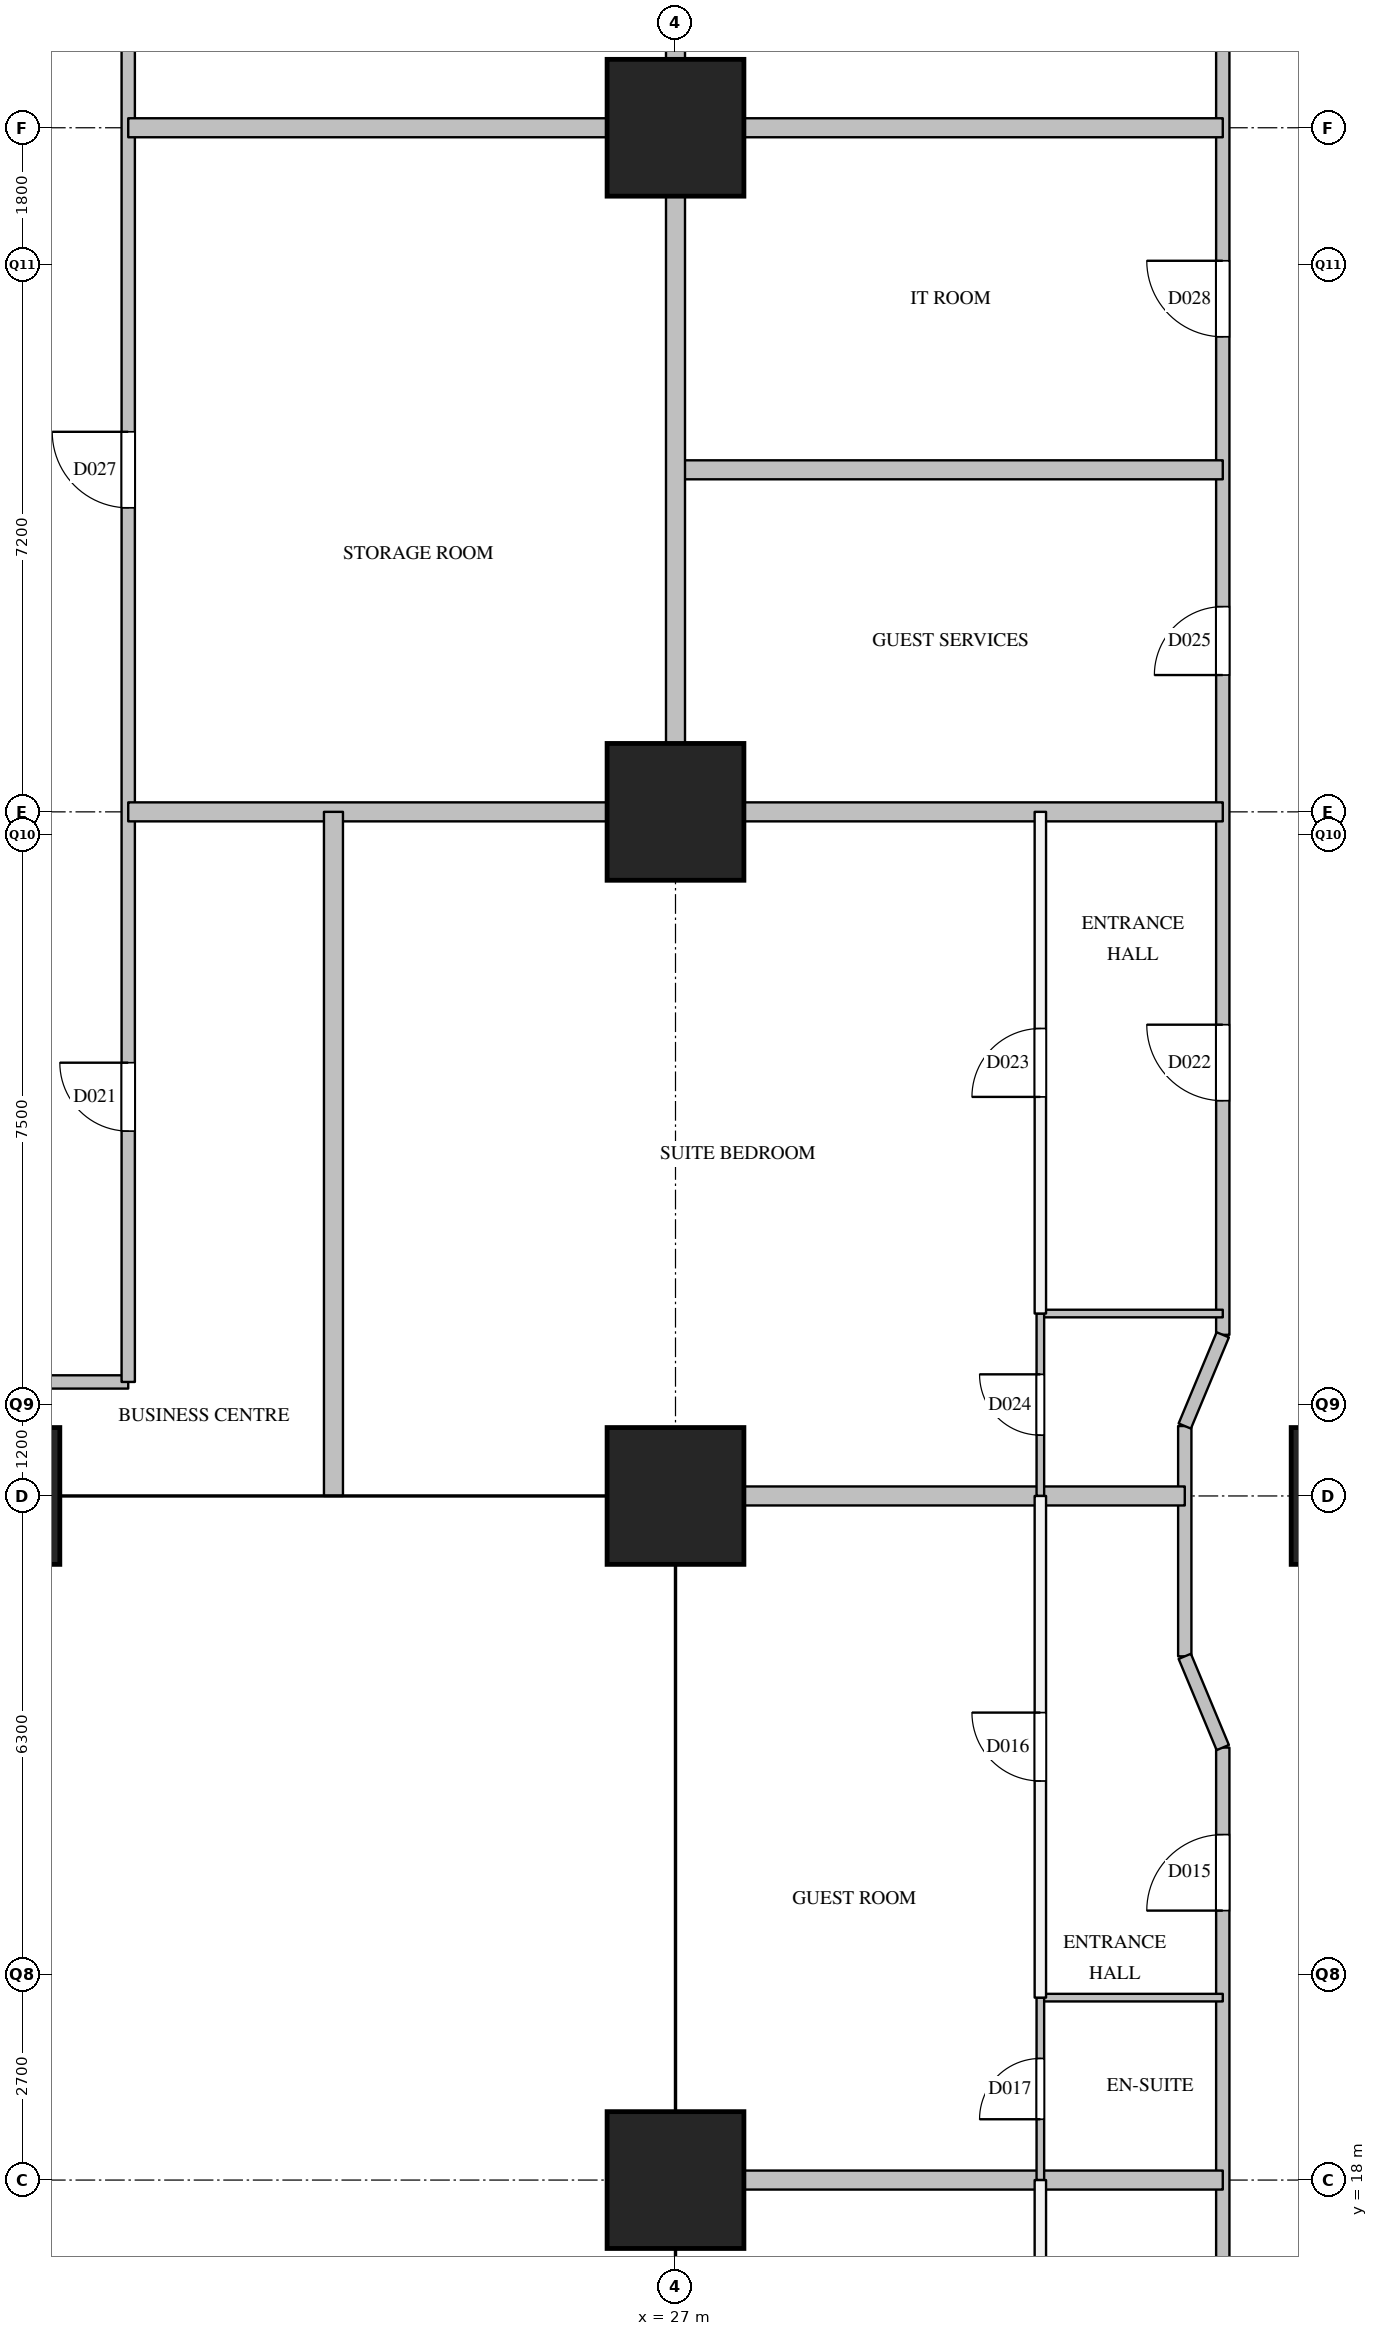
"""IFC4 building model, lengths in metres.
Left out: names, types, materials, properties, quantities, classifications, styles, units other than length and angle.
Written with IfcOpenShell. Run it as: python <this file> out.ifc"""

import sys

from ifc_helpers import new_model, si_unit, direction, frame, frame_2d, origin, origin_2d, place, context, subcontext, project, spatial, rectangle, extrude, element, fill, save


model = new_model("IFC4")
c1 = context("Model", 3, precision=1e-05, world=origin(), true_north=direction((0.0, 1.0)))
c2 = subcontext(c1, "Body", "Model", "MODEL_VIEW")
j1 = project(units=[si_unit("LENGTHUNIT", "METRE"), si_unit("PLANEANGLEUNIT", "RADIAN")], contexts=[c1])
p1 = place(None, origin())
s1 = spatial("IfcSite", under=j1, at=p1, CompositionType="ELEMENT")
p2 = place(p1, origin())
s2 = spatial("IfcBuilding", under=s1, at=p2, CompositionType="ELEMENT")
p3 = place(p2, frame((0.0, 0.0, 96.8)))
s3 = spatial("IfcBuildingStorey", under=s2, at=p3, CompositionType="ELEMENT", Elevation=96.8)
for number, where, z_axis, x_axis in (
    (1, (18.0, 27.0, 0.0), (0.0, 0.0, 1.0), (1.0, 0.0, 0.0)),
    (2, (27.0, 18.0, 0.0), (0.0, 0.0, 1.0), (1.0, 0.0, 0.0)),
    (3, (27.0, 27.0, 0.0), (0.0, 0.0, 1.0), (1.0, 0.0, 0.0)),
    (4, (27.0, 36.0, 0.0), (0.0, 0.0, 1.0), (1.0, 0.0, 0.0)),
    (5, (27.0, 45.0, 0.0), (0.0, 0.0, 1.0), (1.0, 0.0, 0.0)),
    (6, (36.0, 27.0, 0.0), (0.0, 0.0, 1.0), (1.0, 0.0, 0.0)),
):
    element("IfcColumn", number, at=place(p3, frame(where, z_axis=z_axis, x_axis=x_axis)), inside=s3, PredefinedType="COLUMN", context=c2, shape_type="SweptSolid", body=[
        extrude(rectangle(XDim=1.8, YDim=1.8, at=origin_2d()), origin(), (0.0, 0.0, 1.0), 3.8),
    ])
p4 = place(p3, frame((18.0, 28.5, 0.0), z_axis=(0.0, 0.0, 1.0), x_axis=(1.0, 0.0, 0.0)))
e7 = element("IfcWall", 7, at=p4, inside=s3, PredefinedType="PARTITIONING", context=c2, shape_type="SweptSolid", body=[
    extrude(rectangle(XDim=1.8, YDim=0.175, at=frame_2d((0.9, 0.0))), origin(), (0.0, 0.0, 1.0), 3.5),
])
p5 = place(p3, frame((19.8, 28.5, 0.0), z_axis=(0.0, 0.0, 1.0), x_axis=(0.0, 1.0, 0.0)))
e8 = element("IfcWall", 8, at=p5, inside=s3, PredefinedType="PARTITIONING", context=c2, shape_type="SweptSolid", body=[
    extrude(rectangle(XDim=23.3, YDim=0.175, at=frame_2d((11.65, 0.0))), origin(), (0.0, 0.0, 1.0), 3.5),
])
p6 = place(p5, frame((3.3, 0.0, 0.0)))
e9 = element("IfcOpeningElement", 9, at=p6, cuts=e8, PredefinedType="OPENING", context=c2, shape_type="SweptSolid", body=[
    extrude(rectangle(XDim=0.9, YDim=2.1, at=frame_2d((0.45, 1.05))), frame((0.0, 0.097, 0.0), z_axis=(0.0, -1.0, 0.0), x_axis=(1.0, 0.0, 0.0)), (0.0, 0.0, 1.0), 0.195),
])
p7 = place(p5, frame((11.5, 0.0, 0.0)))
e10 = element("IfcOpeningElement", 10, at=p7, cuts=e8, PredefinedType="OPENING", context=c2, shape_type="SweptSolid", body=[
    extrude(rectangle(XDim=1.0, YDim=2.1, at=frame_2d((0.5, 1.05))), frame((0.0, 0.097, 0.0), z_axis=(0.0, -1.0, 0.0), x_axis=(1.0, 0.0, 0.0)), (0.0, 0.0, 1.0), 0.195),
])
p8 = place(p5, frame((19.45, 0.0, 0.0)))
e11 = element("IfcOpeningElement", 11, at=p8, cuts=e8, PredefinedType="OPENING", context=c2, shape_type="SweptSolid", body=[
    extrude(rectangle(XDim=0.9, YDim=2.1, at=frame_2d((0.45, 1.05))), frame((0.0, 0.097, 0.0), z_axis=(0.0, -1.0, 0.0), x_axis=(1.0, 0.0, 0.0)), (0.0, 0.0, 1.0), 0.195),
])
p9 = place(p3, frame((33.7, 24.89, 0.0), z_axis=(0.0, 0.0, 1.0), x_axis=(0.0, 1.0, 0.0)))
e12 = element("IfcWall", 12, at=p9, inside=s3, PredefinedType="PARTITIONING", context=c2, shape_type="SweptSolid", body=[
    extrude(rectangle(XDim=3.03, YDim=0.175, at=frame_2d((1.515, 0.0))), origin(), (0.0, 0.0, 1.0), 2.5),
])
p10 = place(p3, frame((34.2, 7.2, 0.0), z_axis=(0.0, 0.0, 1.0), x_axis=(0.0, 1.0, 0.0)))
e13 = element("IfcWall", 13, at=p10, inside=s3, PredefinedType="PARTITIONING", context=c2, shape_type="SweptSolid", body=[
    extrude(rectangle(XDim=16.49, YDim=0.175, at=frame_2d((8.245, 0.0))), origin(), (0.0, 0.0, 1.0), 3.5),
])
p11 = place(p10, frame((0.45, 0.0, 0.0)))
e14 = element("IfcOpeningElement", 14, at=p11, cuts=e13, PredefinedType="OPENING", context=c2, shape_type="SweptSolid", body=[
    extrude(rectangle(XDim=0.9, YDim=2.1, at=frame_2d((0.45, 1.05))), frame((0.0, 0.097, 0.0), z_axis=(0.0, -1.0, 0.0), x_axis=(1.0, 0.0, 0.0)), (0.0, 0.0, 1.0), 0.195),
])
p12 = place(p10, frame((7.0, 0.0, 0.0)))
e15 = element("IfcOpeningElement", 15, at=p12, cuts=e13, PredefinedType="OPENING", context=c2, shape_type="SweptSolid", body=[
    extrude(rectangle(XDim=1.0, YDim=2.1, at=frame_2d((0.5, 1.05))), frame((0.0, 0.097, 0.0), z_axis=(0.0, -1.0, 0.0), x_axis=(1.0, 0.0, 0.0)), (0.0, 0.0, 1.0), 0.195),
])
p13 = place(p10, frame((14.345, 0.0, 0.0)))
e16 = element("IfcOpeningElement", 16, at=p13, cuts=e13, PredefinedType="OPENING", context=c2, shape_type="SweptSolid", body=[
    extrude(rectangle(XDim=1.0, YDim=2.1, at=frame_2d((0.5, 1.05))), frame((0.0, 0.097, 0.0), z_axis=(0.0, -1.0, 0.0), x_axis=(1.0, 0.0, 0.0)), (0.0, 0.0, 1.0), 0.195),
])
p14 = place(p3, frame((34.2, 29.12, 0.0), z_axis=(0.0, 0.0, 1.0), x_axis=(0.0, 1.0, 0.0)))
e17 = element("IfcWall", 17, at=p14, inside=s3, PredefinedType="PARTITIONING", context=c2, shape_type="SweptSolid", body=[
    extrude(rectangle(XDim=22.68, YDim=0.175, at=frame_2d((11.34, 0.0))), origin(), (0.0, 0.0, 1.0), 3.5),
])
p15 = place(p14, frame((3.08, 0.0, 0.0)))
e18 = element("IfcOpeningElement", 18, at=p15, cuts=e17, PredefinedType="OPENING", context=c2, shape_type="SweptSolid", body=[
    extrude(rectangle(XDim=1.0, YDim=2.1, at=frame_2d((0.5, 1.05))), frame((0.0, 0.097, 0.0), z_axis=(0.0, -1.0, 0.0), x_axis=(1.0, 0.0, 0.0)), (0.0, 0.0, 1.0), 0.195),
])
p16 = place(p14, frame((8.68, 0.0, 0.0)))
e19 = element("IfcOpeningElement", 19, at=p16, cuts=e17, PredefinedType="OPENING", context=c2, shape_type="SweptSolid", body=[
    extrude(rectangle(XDim=0.9, YDim=2.1, at=frame_2d((0.45, 1.05))), frame((0.0, 0.097, 0.0), z_axis=(0.0, -1.0, 0.0), x_axis=(1.0, 0.0, 0.0)), (0.0, 0.0, 1.0), 0.195),
])
p17 = place(p14, frame((13.13, 0.0, 0.0)))
e20 = element("IfcOpeningElement", 20, at=p17, cuts=e17, PredefinedType="OPENING", context=c2, shape_type="SweptSolid", body=[
    extrude(rectangle(XDim=1.0, YDim=2.1, at=frame_2d((0.5, 1.05))), frame((0.0, 0.097, 0.0), z_axis=(0.0, -1.0, 0.0), x_axis=(1.0, 0.0, 0.0)), (0.0, 0.0, 1.0), 0.195),
])
p18 = place(p14, frame((18.83, 0.0, 0.0)))
e21 = element("IfcOpeningElement", 21, at=p18, cuts=e17, PredefinedType="OPENING", context=c2, shape_type="SweptSolid", body=[
    extrude(rectangle(XDim=0.9, YDim=2.1, at=frame_2d((0.45, 1.05))), frame((0.0, 0.097, 0.0), z_axis=(0.0, -1.0, 0.0), x_axis=(1.0, 0.0, 0.0)), (0.0, 0.0, 1.0), 0.195),
])
p19 = place(p3, frame((31.8, 11.4, 0.0), z_axis=(0.0, 0.0, 1.0), x_axis=(0.0, 1.0, 0.0)))
e22 = element("IfcWall", 22, at=p19, inside=s3, PredefinedType="PARTITIONING", context=c2, shape_type="SweptSolid", body=[
    extrude(rectangle(XDim=6.6, YDim=0.15, at=frame_2d((3.3, 0.0))), origin(), (0.0, 0.0, 1.0), 3.5),
])
p20 = place(p19, frame((2.85, 0.0, 0.0)))
e23 = element("IfcOpeningElement", 23, at=p20, cuts=e22, PredefinedType="OPENING", context=c2, shape_type="SweptSolid", body=[
    extrude(rectangle(XDim=0.9, YDim=2.1, at=frame_2d((0.45, 1.05))), frame((0.0, 0.085, 0.0), z_axis=(0.0, -1.0, 0.0), x_axis=(1.0, 0.0, 0.0)), (0.0, 0.0, 1.0), 0.17),
])
p21 = place(p3, frame((31.8, 20.4, 0.0), z_axis=(0.0, 0.0, 1.0), x_axis=(0.0, 1.0, 0.0)))
e24 = element("IfcWall", 24, at=p21, inside=s3, PredefinedType="PARTITIONING", context=c2, shape_type="SweptSolid", body=[
    extrude(rectangle(XDim=6.6, YDim=0.15, at=frame_2d((3.3, 0.0))), origin(), (0.0, 0.0, 1.0), 2.5),
])
p22 = place(p21, frame((2.85, 0.0, 0.0)))
e25 = element("IfcOpeningElement", 25, at=p22, cuts=e24, PredefinedType="OPENING", context=c2, shape_type="SweptSolid", body=[
    extrude(rectangle(XDim=0.9, YDim=2.1, at=frame_2d((0.45, 1.05))), frame((0.0, 0.085, 0.0), z_axis=(0.0, -1.0, 0.0), x_axis=(1.0, 0.0, 0.0)), (0.0, 0.0, 1.0), 0.17),
])
p23 = place(p3, frame((31.8, 29.4, 0.0), z_axis=(0.0, 0.0, 1.0), x_axis=(0.0, 1.0, 0.0)))
e26 = element("IfcWall", 26, at=p23, inside=s3, PredefinedType="PARTITIONING", context=c2, shape_type="SweptSolid", body=[
    extrude(rectangle(XDim=6.6, YDim=0.15, at=frame_2d((3.3, 0.0))), origin(), (0.0, 0.0, 1.0), 3.5),
])
p24 = place(p23, frame((2.85, 0.0, 0.0)))
e27 = element("IfcOpeningElement", 27, at=p24, cuts=e26, PredefinedType="OPENING", context=c2, shape_type="SweptSolid", body=[
    extrude(rectangle(XDim=0.9, YDim=2.1, at=frame_2d((0.45, 1.05))), frame((0.0, 0.085, 0.0), z_axis=(0.0, -1.0, 0.0), x_axis=(1.0, 0.0, 0.0)), (0.0, 0.0, 1.0), 0.17),
])
p25 = place(p3, frame((27.0, 18.0, 0.0), z_axis=(0.0, 0.0, 1.0), x_axis=(1.0, 0.0, 0.0)))
e28 = element("IfcWall", 28, at=p25, inside=s3, PredefinedType="PARTITIONING", context=c2, shape_type="SweptSolid", body=[
    extrude(rectangle(XDim=7.2, YDim=0.25, at=frame_2d((3.6, 0.0))), origin(), (0.0, 0.0, 1.0), 3.5),
])
p26 = place(p3, frame((27.0, 27.0, 0.0), z_axis=(0.0, 0.0, 1.0), x_axis=(1.0, 0.0, 0.0)))
e29 = element("IfcWall", 29, at=p26, inside=s3, PredefinedType="PARTITIONING", context=c2, shape_type="SweptSolid", body=[
    extrude(rectangle(XDim=6.7, YDim=0.25, at=frame_2d((3.35, 0.0))), origin(), (0.0, 0.0, 1.0), 2.5),
])
p27 = place(p3, frame((19.8, 36.0, 0.0), z_axis=(0.0, 0.0, 1.0), x_axis=(1.0, 0.0, 0.0)))
e30 = element("IfcWall", 30, at=p27, inside=s3, PredefinedType="PARTITIONING", context=c2, shape_type="SweptSolid", body=[
    extrude(rectangle(XDim=14.4, YDim=0.25, at=frame_2d((7.2, 0.0))), origin(), (0.0, 0.0, 1.0), 3.5),
])
p28 = place(p3, frame((27.0, 40.5, 0.0), z_axis=(0.0, 0.0, 1.0), x_axis=(1.0, 0.0, 0.0)))
e31 = element("IfcWall", 31, at=p28, inside=s3, PredefinedType="PARTITIONING", context=c2, shape_type="SweptSolid", body=[
    extrude(rectangle(XDim=7.2, YDim=0.25, at=frame_2d((3.6, 0.0))), origin(), (0.0, 0.0, 1.0), 2.5),
])
p29 = place(p3, frame((19.8, 45.0, 0.0), z_axis=(0.0, 0.0, 1.0), x_axis=(1.0, 0.0, 0.0)))
e32 = element("IfcWall", 32, at=p29, inside=s3, PredefinedType="PARTITIONING", context=c2, shape_type="SweptSolid", body=[
    extrude(rectangle(XDim=14.4, YDim=0.25, at=frame_2d((7.2, 0.0))), origin(), (0.0, 0.0, 1.0), 3.5),
])
p30 = place(p3, frame((22.5, 27.0, 0.0), z_axis=(0.0, 0.0, 1.0), x_axis=(0.0, 1.0, 0.0)))
e33 = element("IfcWall", 33, at=p30, inside=s3, PredefinedType="PARTITIONING", context=c2, shape_type="SweptSolid", body=[
    extrude(rectangle(XDim=9.0, YDim=0.25, at=frame_2d((4.5, 0.0))), origin(), (0.0, 0.0, 1.0), 2.5),
])
p31 = place(p3, frame((27.0, 36.0, 0.0), z_axis=(0.0, 0.0, 1.0), x_axis=(0.0, 1.0, 0.0)))
e34 = element("IfcWall", 34, at=p31, inside=s3, PredefinedType="PARTITIONING", context=c2, shape_type="SweptSolid", body=[
    extrude(rectangle(XDim=18.0, YDim=0.25, at=frame_2d((9.0, 0.0))), origin(), (0.0, 0.0, 1.0), 2.5),
])
for number, where, z_axis, x_axis in (
    (35, (31.8, 20.4, 0.0), (0.0, 0.0, 1.0), (1.0, 0.0, 0.0)),
    (36, (31.8, 29.4, 0.0), (0.0, 0.0, 1.0), (1.0, 0.0, 0.0)),
):
    element("IfcWall", number, at=place(p3, frame(where, z_axis=z_axis, x_axis=x_axis)), inside=s3, PredefinedType="PARTITIONING", context=c2, shape_type="SweptSolid", body=[
        extrude(rectangle(XDim=2.4, YDim=0.1, at=frame_2d((1.2, 0.0))), origin(), (0.0, 0.0, 1.0), 3.5),
    ])
p32 = place(p3, frame((31.8, 18.0, 0.0), z_axis=(0.0, 0.0, 1.0), x_axis=(0.0, 1.0, 0.0)))
e37 = element("IfcWall", 37, at=p32, inside=s3, PredefinedType="PARTITIONING", context=c2, shape_type="SweptSolid", body=[
    extrude(rectangle(XDim=2.4, YDim=0.1, at=frame_2d((1.2, 0.0))), origin(), (0.0, 0.0, 1.0), 3.5),
])
p33 = place(p32, frame((0.8, 0.0, 0.0)))
e38 = element("IfcOpeningElement", 38, at=p33, cuts=e37, PredefinedType="OPENING", context=c2, shape_type="SweptSolid", body=[
    extrude(rectangle(XDim=0.8, YDim=2.1, at=frame_2d((0.4, 1.05))), frame((0.0, 0.06, 0.0), z_axis=(0.0, -1.0, 0.0), x_axis=(1.0, 0.0, 0.0)), (0.0, 0.0, 1.0), 0.12),
])
p34 = place(p3, frame((31.8, 27.0, 0.0), z_axis=(0.0, 0.0, 1.0), x_axis=(0.0, 1.0, 0.0)))
e39 = element("IfcWall", 39, at=p34, inside=s3, PredefinedType="PARTITIONING", context=c2, shape_type="SweptSolid", body=[
    extrude(rectangle(XDim=2.4, YDim=0.1, at=frame_2d((1.2, 0.0))), origin(), (0.0, 0.0, 1.0), 2.5),
])
p35 = place(p34, frame((0.8, 0.0, 0.0)))
e40 = element("IfcOpeningElement", 40, at=p35, cuts=e39, PredefinedType="OPENING", context=c2, shape_type="SweptSolid", body=[
    extrude(rectangle(XDim=0.8, YDim=2.1, at=frame_2d((0.4, 1.05))), frame((0.0, 0.06, 0.0), z_axis=(0.0, -1.0, 0.0), x_axis=(1.0, 0.0, 0.0)), (0.0, 0.0, 1.0), 0.12),
])
p36 = place(p3, frame((34.2, 23.69, 0.0), z_axis=(0.0, 0.0, 1.0), x_axis=(-0.384628719983, 0.923071366561, 0.0)))
e41 = element("IfcWall", 41, at=p36, inside=s3, PredefinedType="PARTITIONING", context=c2, shape_type="SweptSolid", body=[
    extrude(rectangle(XDim=1.3, YDim=0.175, at=frame_2d((0.65, 0.0))), origin(), (0.0, 0.0, 1.0), 3.5),
])
p37 = place(p3, frame((33.7, 27.92, 0.0), z_axis=(0.0, 0.0, 1.0), x_axis=(0.384562051588, 0.923099143363, 0.0)))
e42 = element("IfcWall", 42, at=p37, inside=s3, PredefinedType="PARTITIONING", context=c2, shape_type="SweptSolid", body=[
    extrude(rectangle(XDim=1.3, YDim=0.175, at=frame_2d((0.65, 0.0))), origin(), (0.0, 0.0, 1.0), 3.5),
])
p38 = place(p13, origin())
e43 = element("IfcDoor", 43, at=p38, inside=s3, OperationType="SINGLE_SWING_LEFT", PredefinedType="DOOR", context=c2, shape_type="SweptSolid", body=[
    extrude(rectangle(XDim=1.0, YDim=2.1, at=frame_2d((0.5, 1.05))), frame((0.0, 0.025, 0.0), z_axis=(0.0, -1.0, 0.0), x_axis=(1.0, 0.0, 0.0)), (0.0, 0.0, 1.0), 0.05),
])
fill(e16, e43)
p39 = place(p22, origin())
e44 = element("IfcDoor", 44, at=p39, inside=s3, OperationType="SINGLE_SWING_RIGHT", PredefinedType="DOOR", context=c2, shape_type="SweptSolid", body=[
    extrude(rectangle(XDim=0.9, YDim=2.1, at=frame_2d((0.45, 1.05))), frame((0.0, 0.025, 0.0), z_axis=(0.0, -1.0, 0.0), x_axis=(1.0, 0.0, 0.0)), (0.0, 0.0, 1.0), 0.05),
])
fill(e25, e44)
p40 = place(p33, origin())
e45 = element("IfcDoor", 45, at=p40, inside=s3, OperationType="SINGLE_SWING_LEFT", PredefinedType="DOOR", context=c2, shape_type="SweptSolid", body=[
    extrude(rectangle(XDim=0.8, YDim=2.1, at=frame_2d((0.4, 1.05))), frame((0.0, 0.025, 0.0), z_axis=(0.0, -1.0, 0.0), x_axis=(1.0, 0.0, 0.0)), (0.0, 0.0, 1.0), 0.05),
])
fill(e38, e45)
p41 = place(p6, origin())
e46 = element("IfcDoor", 46, at=p41, inside=s3, OperationType="SINGLE_SWING_RIGHT", PredefinedType="DOOR", context=c2, shape_type="SweptSolid", body=[
    extrude(rectangle(XDim=0.9, YDim=2.1, at=frame_2d((0.45, 1.05))), frame((0.0, 0.025, 0.0), z_axis=(0.0, -1.0, 0.0), x_axis=(1.0, 0.0, 0.0)), (0.0, 0.0, 1.0), 0.05),
])
fill(e9, e46)
p42 = place(p15, origin())
e47 = element("IfcDoor", 47, at=p42, inside=s3, OperationType="SINGLE_SWING_RIGHT", PredefinedType="DOOR", context=c2, shape_type="SweptSolid", body=[
    extrude(rectangle(XDim=1.0, YDim=2.1, at=frame_2d((0.5, 1.05))), frame((0.0, 0.025, 0.0), z_axis=(0.0, -1.0, 0.0), x_axis=(1.0, 0.0, 0.0)), (0.0, 0.0, 1.0), 0.05),
])
fill(e18, e47)
p43 = place(p24, origin())
e48 = element("IfcDoor", 48, at=p43, inside=s3, OperationType="SINGLE_SWING_LEFT", PredefinedType="DOOR", context=c2, shape_type="SweptSolid", body=[
    extrude(rectangle(XDim=0.9, YDim=2.1, at=frame_2d((0.45, 1.05))), frame((0.0, 0.025, 0.0), z_axis=(0.0, -1.0, 0.0), x_axis=(1.0, 0.0, 0.0)), (0.0, 0.0, 1.0), 0.05),
])
fill(e27, e48)
p44 = place(p35, origin())
e49 = element("IfcDoor", 49, at=p44, inside=s3, OperationType="SINGLE_SWING_RIGHT", PredefinedType="DOOR", context=c2, shape_type="SweptSolid", body=[
    extrude(rectangle(XDim=0.8, YDim=2.1, at=frame_2d((0.4, 1.05))), frame((0.0, 0.025, 0.0), z_axis=(0.0, -1.0, 0.0), x_axis=(1.0, 0.0, 0.0)), (0.0, 0.0, 1.0), 0.05),
])
fill(e40, e49)
p45 = place(p16, origin())
e50 = element("IfcDoor", 50, at=p45, inside=s3, OperationType="SINGLE_SWING_LEFT", PredefinedType="DOOR", context=c2, shape_type="SweptSolid", body=[
    extrude(rectangle(XDim=0.9, YDim=2.1, at=frame_2d((0.45, 1.05))), frame((0.0, 0.025, 0.0), z_axis=(0.0, -1.0, 0.0), x_axis=(1.0, 0.0, 0.0)), (0.0, 0.0, 1.0), 0.05),
])
fill(e19, e50)
p46 = place(p7, origin())
e51 = element("IfcDoor", 51, at=p46, inside=s3, OperationType="SINGLE_SWING_RIGHT", PredefinedType="DOOR", context=c2, shape_type="SweptSolid", body=[
    extrude(rectangle(XDim=1.0, YDim=2.1, at=frame_2d((0.5, 1.05))), frame((0.0, 0.025, 0.0), z_axis=(0.0, -1.0, 0.0), x_axis=(1.0, 0.0, 0.0)), (0.0, 0.0, 1.0), 0.05),
])
fill(e10, e51)
p47 = place(p17, origin())
e52 = element("IfcDoor", 52, at=p47, inside=s3, OperationType="SINGLE_SWING_RIGHT", PredefinedType="DOOR", context=c2, shape_type="SweptSolid", body=[
    extrude(rectangle(XDim=1.0, YDim=2.1, at=frame_2d((0.5, 1.05))), frame((0.0, 0.025, 0.0), z_axis=(0.0, -1.0, 0.0), x_axis=(1.0, 0.0, 0.0)), (0.0, 0.0, 1.0), 0.05),
])
fill(e20, e52)
save(model, sys.argv[1])
